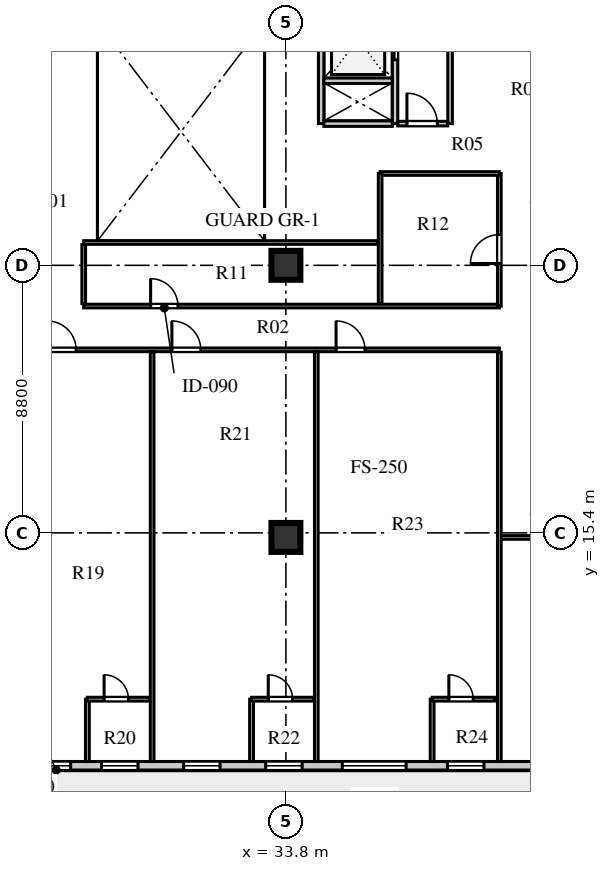
"""IFC4 building model, lengths in metres.
Left out: names, types, materials, properties, quantities, classifications, styles, units other than length and angle.
Written with IfcOpenShell. Run it as: python <this file> out.ifc"""

import sys

from ifc_helpers import new_model, si_unit, direction, frame, frame_2d, origin, origin_2d, place, context, subcontext, project, spatial, rectangle, extrude, element, fill, save


model = new_model("IFC4")
c1 = context("Model", 3, precision=1e-05, world=origin(), true_north=direction((0.0, 1.0)))
c2 = subcontext(c1, "Body", "Model", "MODEL_VIEW")
j1 = project(units=[si_unit("LENGTHUNIT", "METRE"), si_unit("PLANEANGLEUNIT", "RADIAN")], contexts=[c1])
p1 = place(None, origin())
s1 = spatial("IfcSite", under=j1, at=p1, CompositionType="ELEMENT")
p2 = place(p1, origin())
s2 = spatial("IfcBuilding", under=s1, at=p2, CompositionType="ELEMENT")
p3 = place(p2, frame((0.0, 0.0, 181.0)))
s3 = spatial("IfcBuildingStorey", under=s2, at=p3, CompositionType="ELEMENT", Elevation=181.0)
for number, where, z_axis, x_axis in (
    (1, (33.8, 15.25, 0.0), (0.0, 0.0, 1.0), (1.0, 0.0, 0.0)),
    (2, (33.8, 24.2, 0.0), (0.0, 0.0, 1.0), (1.0, 0.0, 0.0)),
):
    element("IfcColumn", number, at=place(p3, frame(where, z_axis=z_axis, x_axis=x_axis)), inside=s3, PredefinedType="COLUMN", context=c2, shape_type="SweptSolid", body=[
        extrude(rectangle(XDim=0.95, YDim=0.95, at=origin_2d()), origin(), (0.0, 0.0, 1.0), 3.6),
    ])
p4 = place(p3, frame((13.05, 7.74, 0.0), z_axis=(0.0, 0.0, 1.0), x_axis=(1.0, 0.0, 0.0)))
e3 = element("IfcWall", 3, at=p4, inside=s3, PredefinedType="STANDARD", context=c2, shape_type="SweptSolid", body=[
    extrude(rectangle(XDim=32.5, YDim=0.28, at=frame_2d((16.25, 0.0))), origin(), (0.0, 0.0, 1.0), 3.6),
])
p5 = place(p4, frame((0.95, 0.0, 0.0)))
e4 = element("IfcOpeningElement", 4, at=p5, cuts=e3, PredefinedType="OPENING", context=c2, shape_type="SweptSolid", body=[
    extrude(rectangle(XDim=1.0, YDim=2.05, at=frame_2d((0.5, 1.025))), frame((0.0, 0.15, 0.0), z_axis=(0.0, -1.0, 0.0), x_axis=(1.0, 0.0, 0.0)), (0.0, 0.0, 1.0), 0.3),
])
p6 = place(p4, frame((5.905, 0.0, 0.8)))
e5 = element("IfcOpeningElement", 5, at=p6, cuts=e3, PredefinedType="OPENING", context=c2, shape_type="SweptSolid", body=[
    extrude(rectangle(XDim=2.25, YDim=2.0, at=frame_2d((1.125, 1.0))), frame((0.0, 0.15, 0.0), z_axis=(0.0, -1.0, 0.0), x_axis=(1.0, 0.0, 0.0)), (0.0, 0.0, 1.0), 0.3),
])
p7 = place(p4, frame((12.72, 0.0, 0.8)))
e6 = element("IfcOpeningElement", 6, at=p7, cuts=e3, PredefinedType="OPENING", context=c2, shape_type="SweptSolid", body=[
    extrude(rectangle(XDim=0.95, YDim=1.65, at=frame_2d((0.475, 0.825))), frame((0.0, 0.15, 0.0), z_axis=(0.0, -1.0, 0.0), x_axis=(1.0, 0.0, 0.0)), (0.0, 0.0, 1.0), 0.3),
])
p8 = place(p4, frame((14.685, 0.0, 0.8)))
e7 = element("IfcOpeningElement", 7, at=p8, cuts=e3, PredefinedType="OPENING", context=c2, shape_type="SweptSolid", body=[
    extrude(rectangle(XDim=1.2, YDim=1.75, at=frame_2d((0.6, 0.875))), frame((0.0, 0.15, 0.0), z_axis=(0.0, -1.0, 0.0), x_axis=(1.0, 0.0, 0.0)), (0.0, 0.0, 1.0), 0.3),
])
p9 = place(p4, frame((17.385, 0.0, 0.8)))
e8 = element("IfcOpeningElement", 8, at=p9, cuts=e3, PredefinedType="OPENING", context=c2, shape_type="SweptSolid", body=[
    extrude(rectangle(XDim=1.2, YDim=1.75, at=frame_2d((0.6, 0.875))), frame((0.0, 0.15, 0.0), z_axis=(0.0, -1.0, 0.0), x_axis=(1.0, 0.0, 0.0)), (0.0, 0.0, 1.0), 0.3),
])
p10 = place(p4, frame((20.085, 0.0, 0.8)))
e9 = element("IfcOpeningElement", 9, at=p10, cuts=e3, PredefinedType="OPENING", context=c2, shape_type="SweptSolid", body=[
    extrude(rectangle(XDim=1.2, YDim=1.75, at=frame_2d((0.6, 0.875))), frame((0.0, 0.15, 0.0), z_axis=(0.0, -1.0, 0.0), x_axis=(1.0, 0.0, 0.0)), (0.0, 0.0, 1.0), 0.3),
])
p11 = place(p4, frame((22.605, 0.0, 0.8)))
e10 = element("IfcOpeningElement", 10, at=p11, cuts=e3, PredefinedType="OPENING", context=c2, shape_type="SweptSolid", body=[
    extrude(rectangle(XDim=2.1, YDim=1.95, at=frame_2d((1.05, 0.975))), frame((0.0, 0.15, 0.0), z_axis=(0.0, -1.0, 0.0), x_axis=(1.0, 0.0, 0.0)), (0.0, 0.0, 1.0), 0.3),
])
p12 = place(p4, frame((26.065, 0.0, 0.8)))
e11 = element("IfcOpeningElement", 11, at=p12, cuts=e3, PredefinedType="OPENING", context=c2, shape_type="SweptSolid", body=[
    extrude(rectangle(XDim=1.2, YDim=1.75, at=frame_2d((0.6, 0.875))), frame((0.0, 0.15, 0.0), z_axis=(0.0, -1.0, 0.0), x_axis=(1.0, 0.0, 0.0)), (0.0, 0.0, 1.0), 0.3),
])
p13 = place(p4, frame((29.255, 0.0, 0.8)))
e12 = element("IfcOpeningElement", 12, at=p13, cuts=e3, PredefinedType="OPENING", context=c2, shape_type="SweptSolid", body=[
    extrude(rectangle(XDim=1.65, YDim=1.95, at=frame_2d((0.825, 0.975))), frame((0.0, 0.15, 0.0), z_axis=(0.0, -1.0, 0.0), x_axis=(1.0, 0.0, 0.0)), (0.0, 0.0, 1.0), 0.3),
])
p14 = place(p3, frame((34.96, 28.86, 0.0), z_axis=(0.0, 0.0, 1.0), x_axis=(0.0, 1.0, 0.0)))
e13 = element("IfcWall", 13, at=p14, inside=s3, PredefinedType="SOLIDWALL", context=c2, shape_type="SweptSolid", body=[
    extrude(rectangle(XDim=4.22, YDim=0.18, at=frame_2d((2.11, 0.0))), origin(), (0.0, 0.0, 1.0), 3.6),
])
p15 = place(p3, frame((37.39, 28.86, 0.0), z_axis=(0.0, 0.0, 1.0), x_axis=(0.0, 1.0, 0.0)))
e14 = element("IfcWall", 14, at=p15, inside=s3, PredefinedType="SOLIDWALL", context=c2, shape_type="SweptSolid", body=[
    extrude(rectangle(XDim=4.22, YDim=0.18, at=frame_2d((2.11, 0.0))), origin(), (0.0, 0.0, 1.0), 3.6),
])
p16 = place(p15, frame((2.1, 0.0, 0.0)))
e15 = element("IfcOpeningElement", 15, at=p16, cuts=e14, PredefinedType="OPENING", context=c2, shape_type="SweptSolid", body=[
    extrude(rectangle(XDim=1.2, YDim=2.12, at=frame_2d((0.6, 1.06))), frame((0.0, 0.1, 0.0), z_axis=(0.0, -1.0, 0.0), x_axis=(1.0, 0.0, 0.0)), (0.0, 0.0, 1.0), 0.2),
])
for number, where, z_axis, x_axis in (
    (16, (35.05, 28.86, 0.0), (0.0, 0.0, 1.0), (1.0, 0.0, 0.0)),
    (17, (35.05, 30.27, 0.0), (0.0, 0.0, 1.0), (1.0, 0.0, 0.0)),
):
    element("IfcWall", number, at=place(p3, frame(where, z_axis=z_axis, x_axis=x_axis)), inside=s3, PredefinedType="SOLIDWALL", context=c2, shape_type="SweptSolid", body=[
        extrude(rectangle(XDim=2.25, YDim=0.18, at=frame_2d((1.125, 0.0))), origin(), (0.0, 0.0, 1.0), 3.6),
    ])
p17 = place(p3, frame((39.2, 28.86, 0.0), z_axis=(0.0, 0.0, 1.0), x_axis=(0.0, 1.0, 0.0)))
e18 = element("IfcWall", 18, at=p17, inside=s3, PredefinedType="PARTITIONING", context=c2, shape_type="SweptSolid", body=[
    extrude(rectangle(XDim=4.22, YDim=0.15, at=frame_2d((2.11, 0.0))), origin(), (0.0, 0.0, 1.0), 3.6),
])
p18 = place(p3, frame((37.48, 28.86, 0.0), z_axis=(0.0, 0.0, 1.0), x_axis=(1.0, 0.0, 0.0)))
e19 = element("IfcWall", 19, at=p18, inside=s3, PredefinedType="PARTITIONING", context=c2, shape_type="SweptSolid", body=[
    extrude(rectangle(XDim=1.64, YDim=0.15, at=frame_2d((0.82, 0.0))), origin(), (0.0, 0.0, 1.0), 3.6),
])
p19 = place(p18, frame((0.3, 0.0, 0.0)))
e20 = element("IfcOpeningElement", 20, at=p19, cuts=e19, PredefinedType="OPENING", context=c2, shape_type="SweptSolid", body=[
    extrude(rectangle(XDim=1.0, YDim=2.1, at=frame_2d((0.5, 1.05))), frame((0.0, 0.085, 0.0), z_axis=(0.0, -1.0, 0.0), x_axis=(1.0, 0.0, 0.0)), (0.0, 0.0, 1.0), 0.17),
])
p20 = place(p3, frame((25.22, 21.42, 0.0), z_axis=(0.0, 0.0, 1.0), x_axis=(1.0, 0.0, 0.0)))
e21 = element("IfcWall", 21, at=p20, inside=s3, PredefinedType="PARTITIONING", context=c2, shape_type="SweptSolid", body=[
    extrude(rectangle(XDim=15.6, YDim=0.12, at=frame_2d((7.8, 0.0))), origin(), (0.0, 0.0, 1.0), 3.25),
])
p21 = place(p20, frame((0.73, 0.0, 0.0)))
e22 = element("IfcOpeningElement", 22, at=p21, cuts=e21, PredefinedType="OPENING", context=c2, shape_type="SweptSolid", body=[
    extrude(rectangle(XDim=0.95, YDim=2.1, at=frame_2d((0.475, 1.05))), frame((0.0, 0.07, 0.0), z_axis=(0.0, -1.0, 0.0), x_axis=(1.0, 0.0, 0.0)), (0.0, 0.0, 1.0), 0.14),
])
p22 = place(p20, frame((4.83, 0.0, 0.0)))
e23 = element("IfcOpeningElement", 23, at=p22, cuts=e21, PredefinedType="OPENING", context=c2, shape_type="SweptSolid", body=[
    extrude(rectangle(XDim=0.95, YDim=2.1, at=frame_2d((0.475, 1.05))), frame((0.0, 0.07, 0.0), z_axis=(0.0, -1.0, 0.0), x_axis=(1.0, 0.0, 0.0)), (0.0, 0.0, 1.0), 0.14),
])
p23 = place(p20, frame((10.23, 0.0, 0.0)))
e24 = element("IfcOpeningElement", 24, at=p23, cuts=e21, PredefinedType="OPENING", context=c2, shape_type="SweptSolid", body=[
    extrude(rectangle(XDim=0.95, YDim=2.1, at=frame_2d((0.475, 1.05))), frame((0.0, 0.07, 0.0), z_axis=(0.0, -1.0, 0.0), x_axis=(1.0, 0.0, 0.0)), (0.0, 0.0, 1.0), 0.14),
])
p24 = place(p3, frame((27.15, 22.86, 0.0), z_axis=(0.0, 0.0, 1.0), x_axis=(1.0, 0.0, 0.0)))
e25 = element("IfcWall", 25, at=p24, inside=s3, PredefinedType="PARTITIONING", context=c2, shape_type="SweptSolid", body=[
    extrude(rectangle(XDim=13.67, YDim=0.12, at=frame_2d((6.835, 0.0))), origin(), (0.0, 0.0, 1.0), 3.6),
])
p25 = place(p24, frame((2.2, 0.0, 0.0)))
e26 = element("IfcOpeningElement", 26, at=p25, cuts=e25, PredefinedType="OPENING", context=c2, shape_type="SweptSolid", body=[
    extrude(rectangle(XDim=0.9, YDim=2.08, at=frame_2d((0.45, 1.04))), frame((0.0, 0.07, 0.0), z_axis=(0.0, -1.0, 0.0), x_axis=(1.0, 0.0, 0.0)), (0.0, 0.0, 1.0), 0.14),
])
p26 = place(p3, frame((40.82, 15.25, 0.0), z_axis=(0.0, 0.0, 1.0), x_axis=(1.0, 0.0, 0.0)))
e27 = element("IfcWall", 27, at=p26, inside=s3, PredefinedType="PARTITIONING", context=c2, shape_type="SweptSolid", body=[
    extrude(rectangle(XDim=9.7, YDim=0.12, at=frame_2d((4.85, 0.0))), origin(), (0.0, 0.0, 1.0), 2.95),
])
p27 = place(p3, frame((40.82, 22.86, 0.0), z_axis=(0.0, 0.0, 1.0), x_axis=(0.0, 1.0, 0.0)))
e28 = element("IfcWall", 28, at=p27, inside=s3, PredefinedType="PARTITIONING", context=c2, shape_type="SweptSolid", body=[
    extrude(rectangle(XDim=4.36, YDim=0.12, at=frame_2d((2.18, 0.0))), origin(), (0.0, 0.0, 1.0), 3.6),
])
p28 = place(p27, frame((1.4, 0.0, 0.0)))
e29 = element("IfcOpeningElement", 29, at=p28, cuts=e28, PredefinedType="OPENING", context=c2, shape_type="SweptSolid", body=[
    extrude(rectangle(XDim=0.95, YDim=2.1, at=frame_2d((0.475, 1.05))), frame((0.0, 0.07, 0.0), z_axis=(0.0, -1.0, 0.0), x_axis=(1.0, 0.0, 0.0)), (0.0, 0.0, 1.0), 0.14),
])
p29 = place(p3, frame((36.9, 27.22, 0.0), z_axis=(0.0, 0.0, 1.0), x_axis=(1.0, 0.0, 0.0)))
e30 = element("IfcWall", 30, at=p29, inside=s3, PredefinedType="PARTITIONING", context=c2, shape_type="SweptSolid", body=[
    extrude(rectangle(XDim=3.92, YDim=0.12, at=frame_2d((1.96, 0.0))), origin(), (0.0, 0.0, 1.0), 3.25),
])
p30 = place(p3, frame((36.9, 22.94, 0.0), z_axis=(0.0, 0.0, 1.0), x_axis=(0.0, 1.0, 0.0)))
e31 = element("IfcWall", 31, at=p30, inside=s3, PredefinedType="PARTITIONING", context=c2, shape_type="SweptSolid", body=[
    extrude(rectangle(XDim=4.28, YDim=0.12, at=frame_2d((2.14, 0.0))), origin(), (0.0, 0.0, 1.0), 3.6),
])
p31 = place(p3, frame((27.15, 24.95, 0.0), z_axis=(0.0, 0.0, 1.0), x_axis=(1.0, 0.0, 0.0)))
e32 = element("IfcWall", 32, at=p31, inside=s3, PredefinedType="PARTITIONING", context=c2, shape_type="SweptSolid", body=[
    extrude(rectangle(XDim=9.67, YDim=0.12, at=frame_2d((4.835, 0.0))), origin(), (0.0, 0.0, 1.0), 3.05),
])
p32 = place(p3, frame((27.15, 22.94, 0.0), z_axis=(0.0, 0.0, 1.0), x_axis=(0.0, 1.0, 0.0)))
e33 = element("IfcWall", 33, at=p32, inside=s3, PredefinedType="PARTITIONING", context=c2, shape_type="SweptSolid", body=[
    extrude(rectangle(XDim=1.94, YDim=0.12, at=frame_2d((0.97, 0.0))), origin(), (0.0, 0.0, 1.0), 3.6),
])
p33 = place(p3, frame((40.82, 7.88, 0.0), z_axis=(0.0, 0.0, 1.0), x_axis=(0.0, 1.0, 0.0)))
e34 = element("IfcWall", 34, at=p33, inside=s3, PredefinedType="PARTITIONING", context=c2, shape_type="SweptSolid", body=[
    extrude(rectangle(XDim=13.46, YDim=0.12, at=frame_2d((6.73, 0.0))), origin(), (0.0, 0.0, 1.0), 3.6),
])
p34 = place(p3, frame((27.27, 7.88, 0.0), z_axis=(0.0, 0.0, 1.0), x_axis=(0.0, 1.0, 0.0)))
e35 = element("IfcWall", 35, at=p34, inside=s3, PredefinedType="PLUMBINGWALL", context=c2, shape_type="SweptSolid", body=[
    extrude(rectangle(XDim=2.05, YDim=0.125, at=frame_2d((1.025, 0.0))), origin(), (0.0, 0.0, 1.0), 3.6),
])
p35 = place(p3, frame((27.27, 9.93, 0.0), z_axis=(0.0, 0.0, 1.0), x_axis=(1.0, 0.0, 0.0)))
e36 = element("IfcWall", 36, at=p35, inside=s3, PredefinedType="PLUMBINGWALL", context=c2, shape_type="SweptSolid", body=[
    extrude(rectangle(XDim=2.05, YDim=0.125, at=frame_2d((1.025, 0.0))), origin(), (0.0, 0.0, 1.0), 3.6),
])
p36 = place(p35, frame((0.55, 0.0, 0.0)))
e37 = element("IfcOpeningElement", 37, at=p36, cuts=e36, PredefinedType="OPENING", context=c2, shape_type="SweptSolid", body=[
    extrude(rectangle(XDim=0.8, YDim=2.05, at=frame_2d((0.4, 1.025))), frame((0.0, 0.073, 0.0), z_axis=(0.0, -1.0, 0.0), x_axis=(1.0, 0.0, 0.0)), (0.0, 0.0, 1.0), 0.145),
])
p37 = place(p3, frame((29.4, 7.88, 0.0), z_axis=(0.0, 0.0, 1.0), x_axis=(0.0, 1.0, 0.0)))
e38 = element("IfcWall", 38, at=p37, inside=s3, PredefinedType="PARTITIONING", context=c2, shape_type="SweptSolid", body=[
    extrude(rectangle(XDim=13.48, YDim=0.12, at=frame_2d((6.74, 0.0))), origin(), (0.0, 0.0, 1.0), 3.6),
])
p38 = place(p3, frame((32.67, 7.88, 0.0), z_axis=(0.0, 0.0, 1.0), x_axis=(0.0, 1.0, 0.0)))
e39 = element("IfcWall", 39, at=p38, inside=s3, PredefinedType="PLUMBINGWALL", context=c2, shape_type="SweptSolid", body=[
    extrude(rectangle(XDim=2.05, YDim=0.125, at=frame_2d((1.025, 0.0))), origin(), (0.0, 0.0, 1.0), 3.6),
])
p39 = place(p3, frame((32.67, 9.93, 0.0), z_axis=(0.0, 0.0, 1.0), x_axis=(1.0, 0.0, 0.0)))
e40 = element("IfcWall", 40, at=p39, inside=s3, PredefinedType="PLUMBINGWALL", context=c2, shape_type="SweptSolid", body=[
    extrude(rectangle(XDim=2.05, YDim=0.125, at=frame_2d((1.025, 0.0))), origin(), (0.0, 0.0, 1.0), 3.6),
])
p40 = place(p39, frame((0.55, 0.0, 0.0)))
e41 = element("IfcOpeningElement", 41, at=p40, cuts=e40, PredefinedType="OPENING", context=c2, shape_type="SweptSolid", body=[
    extrude(rectangle(XDim=0.8, YDim=2.05, at=frame_2d((0.4, 1.025))), frame((0.0, 0.073, 0.0), z_axis=(0.0, -1.0, 0.0), x_axis=(1.0, 0.0, 0.0)), (0.0, 0.0, 1.0), 0.145),
])
p41 = place(p3, frame((34.8, 7.88, 0.0), z_axis=(0.0, 0.0, 1.0), x_axis=(0.0, 1.0, 0.0)))
e42 = element("IfcWall", 42, at=p41, inside=s3, PredefinedType="PARTITIONING", context=c2, shape_type="SweptSolid", body=[
    extrude(rectangle(XDim=13.48, YDim=0.12, at=frame_2d((6.74, 0.0))), origin(), (0.0, 0.0, 1.0), 3.6),
])
p42 = place(p3, frame((38.61, 7.88, 0.0), z_axis=(0.0, 0.0, 1.0), x_axis=(0.0, 1.0, 0.0)))
e43 = element("IfcWall", 43, at=p42, inside=s3, PredefinedType="PLUMBINGWALL", context=c2, shape_type="SweptSolid", body=[
    extrude(rectangle(XDim=2.05, YDim=0.125, at=frame_2d((1.025, 0.0))), origin(), (0.0, 0.0, 1.0), 3.6),
])
p43 = place(p3, frame((38.61, 9.93, 0.0), z_axis=(0.0, 0.0, 1.0), x_axis=(1.0, 0.0, 0.0)))
e44 = element("IfcWall", 44, at=p43, inside=s3, PredefinedType="PLUMBINGWALL", context=c2, shape_type="SweptSolid", body=[
    extrude(rectangle(XDim=2.05, YDim=0.125, at=frame_2d((1.025, 0.0))), origin(), (0.0, 0.0, 1.0), 3.6),
])
p44 = place(p43, frame((0.55, 0.0, 0.0)))
e45 = element("IfcOpeningElement", 45, at=p44, cuts=e44, PredefinedType="OPENING", context=c2, shape_type="SweptSolid", body=[
    extrude(rectangle(XDim=0.8, YDim=2.05, at=frame_2d((0.4, 1.025))), frame((0.0, 0.073, 0.0), z_axis=(0.0, -1.0, 0.0), x_axis=(1.0, 0.0, 0.0)), (0.0, 0.0, 1.0), 0.145),
])
p45 = place(p7, origin())
e46 = element("IfcWindow", 46, at=p45, inside=s3, PartitioningType="SINGLE_PANEL", PredefinedType="WINDOW", context=c2, shape_type="SweptSolid", body=[
    extrude(rectangle(XDim=0.95, YDim=1.65, at=frame_2d((0.475, 0.825))), frame((0.0, 0.03, 0.0), z_axis=(0.0, -1.0, 0.0), x_axis=(1.0, 0.0, 0.0)), (0.0, 0.0, 1.0), 0.06),
])
fill(e6, e46)
p46 = place(p8, origin())
e47 = element("IfcWindow", 47, at=p46, inside=s3, PartitioningType="SINGLE_PANEL", PredefinedType="WINDOW", context=c2, shape_type="SweptSolid", body=[
    extrude(rectangle(XDim=1.2, YDim=1.75, at=frame_2d((0.6, 0.875))), frame((0.0, 0.03, 0.0), z_axis=(0.0, -1.0, 0.0), x_axis=(1.0, 0.0, 0.0)), (0.0, 0.0, 1.0), 0.06),
])
fill(e7, e47)
p47 = place(p9, origin())
e48 = element("IfcWindow", 48, at=p47, inside=s3, PartitioningType="SINGLE_PANEL", PredefinedType="WINDOW", context=c2, shape_type="SweptSolid", body=[
    extrude(rectangle(XDim=1.2, YDim=1.75, at=frame_2d((0.6, 0.875))), frame((0.0, 0.03, 0.0), z_axis=(0.0, -1.0, 0.0), x_axis=(1.0, 0.0, 0.0)), (0.0, 0.0, 1.0), 0.06),
])
fill(e8, e48)
p48 = place(p10, origin())
e49 = element("IfcWindow", 49, at=p48, inside=s3, PartitioningType="SINGLE_PANEL", PredefinedType="WINDOW", context=c2, shape_type="SweptSolid", body=[
    extrude(rectangle(XDim=1.2, YDim=1.75, at=frame_2d((0.6, 0.875))), frame((0.0, 0.03, 0.0), z_axis=(0.0, -1.0, 0.0), x_axis=(1.0, 0.0, 0.0)), (0.0, 0.0, 1.0), 0.06),
])
fill(e9, e49)
p49 = place(p11, origin())
e50 = element("IfcWindow", 50, at=p49, inside=s3, PartitioningType="SINGLE_PANEL", PredefinedType="WINDOW", context=c2, shape_type="SweptSolid", body=[
    extrude(rectangle(XDim=2.1, YDim=1.95, at=frame_2d((1.05, 0.975))), frame((0.0, 0.03, 0.0), z_axis=(0.0, -1.0, 0.0), x_axis=(1.0, 0.0, 0.0)), (0.0, 0.0, 1.0), 0.06),
])
fill(e10, e50)
p50 = place(p12, origin())
e51 = element("IfcWindow", 51, at=p50, inside=s3, PartitioningType="SINGLE_PANEL", PredefinedType="WINDOW", context=c2, shape_type="SweptSolid", body=[
    extrude(rectangle(XDim=1.2, YDim=1.75, at=frame_2d((0.6, 0.875))), frame((0.0, 0.03, 0.0), z_axis=(0.0, -1.0, 0.0), x_axis=(1.0, 0.0, 0.0)), (0.0, 0.0, 1.0), 0.06),
])
fill(e11, e51)
p51 = place(p16, frame((1.2, 0.0, 0.0), z_axis=(0.0, 0.0, 1.0), x_axis=(-1.0, 0.0, 0.0)))
e52 = element("IfcDoor", 52, at=p51, inside=s3, OperationType="DOUBLE_DOOR_SLIDING", PredefinedType="DOOR", context=c2, shape_type="SweptSolid", body=[
    extrude(rectangle(XDim=1.2, YDim=2.12, at=frame_2d((0.6, 1.06))), frame((0.0, 0.025, 0.0), z_axis=(0.0, -1.0, 0.0), x_axis=(1.0, 0.0, 0.0)), (0.0, 0.0, 1.0), 0.05),
])
fill(e15, e52)
p52 = place(p19, origin())
e53 = element("IfcDoor", 53, at=p52, inside=s3, OperationType="SINGLE_SWING_LEFT", PredefinedType="DOOR", context=c2, shape_type="SweptSolid", body=[
    extrude(rectangle(XDim=1.0, YDim=2.1, at=frame_2d((0.5, 1.05))), frame((0.0, 0.025, 0.0), z_axis=(0.0, -1.0, 0.0), x_axis=(1.0, 0.0, 0.0)), (0.0, 0.0, 1.0), 0.05),
])
fill(e20, e53)
p53 = place(p25, origin())
e54 = element("IfcDoor", 54, at=p53, inside=s3, OperationType="SINGLE_SWING_LEFT", PredefinedType="DOOR", context=c2, shape_type="SweptSolid", body=[
    extrude(rectangle(XDim=0.9, YDim=2.08, at=frame_2d((0.45, 1.04))), frame((0.0, 0.025, 0.0), z_axis=(0.0, -1.0, 0.0), x_axis=(1.0, 0.0, 0.0)), (0.0, 0.0, 1.0), 0.05),
])
fill(e26, e54)
p54 = place(p28, frame((0.95, 0.0, 0.0), z_axis=(0.0, 0.0, 1.0), x_axis=(-1.0, 0.0, 0.0)))
e55 = element("IfcDoor", 55, at=p54, inside=s3, OperationType="SINGLE_SWING_RIGHT", PredefinedType="DOOR", context=c2, shape_type="SweptSolid", body=[
    extrude(rectangle(XDim=0.95, YDim=2.1, at=frame_2d((0.475, 1.05))), frame((0.0, 0.025, 0.0), z_axis=(0.0, -1.0, 0.0), x_axis=(1.0, 0.0, 0.0)), (0.0, 0.0, 1.0), 0.05),
])
fill(e29, e55)
p55 = place(p21, frame((0.95, 0.0, 0.0), z_axis=(0.0, 0.0, 1.0), x_axis=(-1.0, 0.0, 0.0)))
e56 = element("IfcDoor", 56, at=p55, inside=s3, OperationType="SINGLE_SWING_RIGHT", PredefinedType="DOOR", context=c2, shape_type="SweptSolid", body=[
    extrude(rectangle(XDim=0.95, YDim=2.1, at=frame_2d((0.475, 1.05))), frame((0.0, 0.025, 0.0), z_axis=(0.0, -1.0, 0.0), x_axis=(1.0, 0.0, 0.0)), (0.0, 0.0, 1.0), 0.05),
])
fill(e22, e56)
p56 = place(p36, origin())
e57 = element("IfcDoor", 57, at=p56, inside=s3, OperationType="SINGLE_SWING_LEFT", PredefinedType="DOOR", context=c2, shape_type="SweptSolid", body=[
    extrude(rectangle(XDim=0.8, YDim=2.05, at=frame_2d((0.4, 1.025))), frame((0.0, 0.025, 0.0), z_axis=(0.0, -1.0, 0.0), x_axis=(1.0, 0.0, 0.0)), (0.0, 0.0, 1.0), 0.05),
])
fill(e37, e57)
p57 = place(p22, frame((0.95, 0.0, 0.0), z_axis=(0.0, 0.0, 1.0), x_axis=(-1.0, 0.0, 0.0)))
e58 = element("IfcDoor", 58, at=p57, inside=s3, OperationType="SINGLE_SWING_RIGHT", PredefinedType="DOOR", context=c2, shape_type="SweptSolid", body=[
    extrude(rectangle(XDim=0.95, YDim=2.1, at=frame_2d((0.475, 1.05))), frame((0.0, 0.025, 0.0), z_axis=(0.0, -1.0, 0.0), x_axis=(1.0, 0.0, 0.0)), (0.0, 0.0, 1.0), 0.05),
])
fill(e23, e58)
p58 = place(p40, origin())
e59 = element("IfcDoor", 59, at=p58, inside=s3, OperationType="SINGLE_SWING_LEFT", PredefinedType="DOOR", context=c2, shape_type="SweptSolid", body=[
    extrude(rectangle(XDim=0.8, YDim=2.05, at=frame_2d((0.4, 1.025))), frame((0.0, 0.025, 0.0), z_axis=(0.0, -1.0, 0.0), x_axis=(1.0, 0.0, 0.0)), (0.0, 0.0, 1.0), 0.05),
])
fill(e41, e59)
p59 = place(p23, frame((0.95, 0.0, 0.0), z_axis=(0.0, 0.0, 1.0), x_axis=(-1.0, 0.0, 0.0)))
e60 = element("IfcDoor", 60, at=p59, inside=s3, OperationType="SINGLE_SWING_RIGHT", PredefinedType="DOOR", context=c2, shape_type="SweptSolid", body=[
    extrude(rectangle(XDim=0.95, YDim=2.1, at=frame_2d((0.475, 1.05))), frame((0.0, 0.025, 0.0), z_axis=(0.0, -1.0, 0.0), x_axis=(1.0, 0.0, 0.0)), (0.0, 0.0, 1.0), 0.05),
])
fill(e24, e60)
p60 = place(p44, origin())
e61 = element("IfcDoor", 61, at=p60, inside=s3, OperationType="SINGLE_SWING_LEFT", PredefinedType="DOOR", context=c2, shape_type="SweptSolid", body=[
    extrude(rectangle(XDim=0.8, YDim=2.05, at=frame_2d((0.4, 1.025))), frame((0.0, 0.025, 0.0), z_axis=(0.0, -1.0, 0.0), x_axis=(1.0, 0.0, 0.0)), (0.0, 0.0, 1.0), 0.05),
])
fill(e45, e61)
save(model, sys.argv[1])
